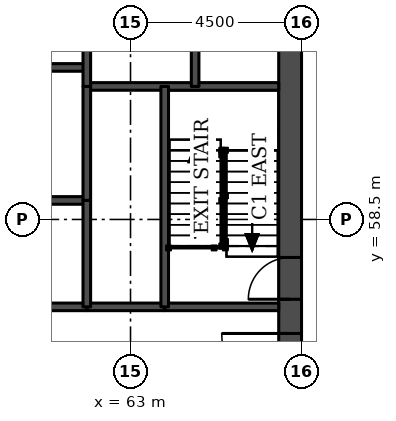
"""IFC4 building model, lengths in metres.
Left out: names, types, materials, properties, quantities, classifications, styles, units other than length and angle.
Written with IfcOpenShell. Run it as: python <this file> out.ifc"""

import sys

from ifc_helpers import new_model, si_unit, direction, frame, frame_2d, origin, place, context, subcontext, project, spatial, rectangle, extrude, element, fill, save


model = new_model("IFC4")
c1 = context("Model", 3, precision=1e-05, world=origin(), true_north=direction((0.0, 1.0)))
c2 = subcontext(c1, "Body", "Model", "MODEL_VIEW")
j1 = project(units=[si_unit("LENGTHUNIT", "METRE"), si_unit("PLANEANGLEUNIT", "RADIAN")], contexts=[c1])
p1 = place(None, origin())
s1 = spatial("IfcSite", under=j1, at=p1, CompositionType="ELEMENT")
p2 = place(p1, origin())
s2 = spatial("IfcBuilding", under=s1, at=p2, CompositionType="ELEMENT")
p3 = place(p2, frame((0.0, 0.0, 13.5)))
s3 = spatial("IfcBuildingStorey", under=s2, at=p3, CompositionType="ELEMENT", Elevation=13.5)
p4 = place(p3, frame((67.2, 49.5, 0.0), z_axis=(0.0, 0.0, 1.0), x_axis=(0.0, 1.0, 0.0)))
e1 = element("IfcWall", 1, at=p4, inside=s3, PredefinedType="SHEAR", context=c2, shape_type="SweptSolid", body=[
    extrude(rectangle(XDim=22.5, YDim=0.6, at=frame_2d((11.25, 0.0))), origin(), (0.0, 0.0, 1.0), 5.0),
])
p5 = place(p4, frame((4.2, 0.0, 0.0)))
e2 = element("IfcOpeningElement", 2, at=p5, cuts=e1, PredefinedType="OPENING", context=c2, shape_type="SweptSolid", body=[
    extrude(rectangle(XDim=1.8, YDim=2.1, at=frame_2d((0.9, 1.05))), frame((0.0, 0.31, 0.0), z_axis=(0.0, -1.0, 0.0), x_axis=(1.0, 0.0, 0.0)), (0.0, 0.0, 1.0), 0.62),
])
p6 = place(p4, frame((6.9, 0.0, 0.0)))
e3 = element("IfcOpeningElement", 3, at=p6, cuts=e1, PredefinedType="OPENING", context=c2, shape_type="SweptSolid", body=[
    extrude(rectangle(XDim=1.1, YDim=2.1, at=frame_2d((0.55, 1.05))), frame((0.0, 0.31, 0.0), z_axis=(0.0, -1.0, 0.0), x_axis=(1.0, 0.0, 0.0)), (0.0, 0.0, 1.0), 0.62),
])
p7 = place(p4, frame((13.6, 0.0, 0.0)))
e4 = element("IfcOpeningElement", 4, at=p7, cuts=e1, PredefinedType="OPENING", context=c2, shape_type="SweptSolid", body=[
    extrude(rectangle(XDim=1.1, YDim=2.1, at=frame_2d((0.55, 1.05))), frame((0.0, 0.31, 0.0), z_axis=(0.0, -1.0, 0.0), x_axis=(1.0, 0.0, 0.0)), (0.0, 0.0, 1.0), 0.62),
])
p8 = place(p4, frame((16.5, 0.0, 0.0)))
e5 = element("IfcOpeningElement", 5, at=p8, cuts=e1, PredefinedType="OPENING", context=c2, shape_type="SweptSolid", body=[
    extrude(rectangle(XDim=1.8, YDim=2.1, at=frame_2d((0.9, 1.05))), frame((0.0, 0.31, 0.0), z_axis=(0.0, -1.0, 0.0), x_axis=(1.0, 0.0, 0.0)), (0.0, 0.0, 1.0), 0.62),
])
p9 = place(p3, frame((61.85, 56.2, 0.0), z_axis=(0.0, 0.0, 1.0), x_axis=(1.0, 0.0, 0.0)))
e6 = element("IfcWall", 6, at=p9, inside=s3, PredefinedType="SOLIDWALL", context=c2, shape_type="SweptSolid", body=[
    extrude(rectangle(XDim=2.05, YDim=0.2, at=frame_2d((1.025, 0.0))), origin(), (0.0, 0.0, 1.0), 4.78),
])
p10 = place(p3, frame((50.65, 56.2, 0.0), z_axis=(0.0, 0.0, 1.0), x_axis=(1.0, 0.0, 0.0)))
e7 = element("IfcWall", 7, at=p10, inside=s3, PredefinedType="SOLIDWALL", context=c2, shape_type="SweptSolid", body=[
    extrude(rectangle(XDim=11.2, YDim=0.2, at=frame_2d((5.6, 0.0))), origin(), (0.0, 0.0, 1.0), 4.78),
])
p11 = place(p3, frame((63.9, 56.2, 0.0), z_axis=(0.0, 0.0, 1.0), x_axis=(1.0, 0.0, 0.0)))
e8 = element("IfcWall", 8, at=p11, inside=s3, PredefinedType="SOLIDWALL", context=c2, shape_type="SweptSolid", body=[
    extrude(rectangle(XDim=3.0, YDim=0.2, at=frame_2d((1.5, 0.0))), origin(), (0.0, 0.0, 1.0), 4.78),
])
p12 = place(p3, frame((50.65, 59.0, 0.0), z_axis=(0.0, 0.0, 1.0), x_axis=(1.0, 0.0, 0.0)))
e9 = element("IfcWall", 9, at=p12, inside=s3, PredefinedType="SOLIDWALL", context=c2, shape_type="SweptSolid", body=[
    extrude(rectangle(XDim=11.2, YDim=0.2, at=frame_2d((5.6, 0.0))), origin(), (0.0, 0.0, 1.0), 5.0),
])
p13 = place(p3, frame((61.85, 62.0, 0.0), z_axis=(0.0, 0.0, 1.0), x_axis=(1.0, 0.0, 0.0)))
e10 = element("IfcWall", 10, at=p13, inside=s3, PredefinedType="SOLIDWALL", context=c2, shape_type="SweptSolid", body=[
    extrude(rectangle(XDim=5.05, YDim=0.2, at=frame_2d((2.525, 0.0))), origin(), (0.0, 0.0, 1.0), 4.78),
])
p14 = place(p3, frame((50.65, 62.5, 0.0), z_axis=(0.0, 0.0, 1.0), x_axis=(1.0, 0.0, 0.0)))
e11 = element("IfcWall", 11, at=p14, inside=s3, PredefinedType="SOLIDWALL", context=c2, shape_type="SweptSolid", body=[
    extrude(rectangle(XDim=11.2, YDim=0.2, at=frame_2d((5.6, 0.0))), origin(), (0.0, 0.0, 1.0), 5.0),
])
p15 = place(p3, frame((61.85, 59.0, 0.0), z_axis=(0.0, 0.0, 1.0), x_axis=(0.0, 1.0, 0.0)))
e12 = element("IfcWall", 12, at=p15, inside=s3, PredefinedType="SOLIDWALL", context=c2, shape_type="SweptSolid", body=[
    extrude(rectangle(XDim=3.0, YDim=0.2, at=frame_2d((1.5, 0.0))), origin(), (0.0, 0.0, 1.0), 5.0),
])
p16 = place(p3, frame((61.85, 56.2, 0.0), z_axis=(0.0, 0.0, 1.0), x_axis=(0.0, 1.0, 0.0)))
e13 = element("IfcWall", 13, at=p16, inside=s3, PredefinedType="SOLIDWALL", context=c2, shape_type="SweptSolid", body=[
    extrude(rectangle(XDim=2.8, YDim=0.2, at=frame_2d((1.4, 0.0))), origin(), (0.0, 0.0, 1.0), 4.78),
])
p17 = place(p3, frame((61.85, 62.0, 0.0), z_axis=(0.0, 0.0, 1.0), x_axis=(0.0, 1.0, 0.0)))
e14 = element("IfcWall", 14, at=p17, inside=s3, PredefinedType="SOLIDWALL", context=c2, shape_type="SweptSolid", body=[
    extrude(rectangle(XDim=3.3, YDim=0.2, at=frame_2d((1.65, 0.0))), origin(), (0.0, 0.0, 1.0), 4.78),
])
p18 = place(p3, frame((63.9, 56.2, 0.0), z_axis=(0.0, 0.0, 1.0), x_axis=(0.0, 1.0, 0.0)))
e15 = element("IfcWall", 15, at=p18, inside=s3, PredefinedType="SOLIDWALL", context=c2, shape_type="SweptSolid", body=[
    extrude(rectangle(XDim=5.8, YDim=0.2, at=frame_2d((2.9, 0.0))), origin(), (0.0, 0.0, 1.0), 4.78),
])
p19 = place(p3, frame((64.7, 62.0, 0.0), z_axis=(0.0, 0.0, 1.0), x_axis=(0.0, 1.0, 0.0)))
e16 = element("IfcWall", 16, at=p19, inside=s3, PredefinedType="SOLIDWALL", context=c2, shape_type="SweptSolid", body=[
    extrude(rectangle(XDim=3.3, YDim=0.2, at=frame_2d((1.65, 0.0))), origin(), (0.0, 0.0, 1.0), 4.78),
])
p20 = place(p19, frame((1.1, 0.0, 0.0)))
e17 = element("IfcOpeningElement", 17, at=p20, cuts=e16, PredefinedType="OPENING", context=c2, shape_type="SweptSolid", body=[
    extrude(rectangle(XDim=1.1, YDim=2.1, at=frame_2d((0.55, 1.05))), frame((0.0, 0.11, 0.0), z_axis=(0.0, -1.0, 0.0), x_axis=(1.0, 0.0, 0.0)), (0.0, 0.0, 1.0), 0.22),
])
p21 = place(p5, origin())
e18 = element("IfcDoor", 18, at=p21, inside=s3, OperationType="SINGLE_SWING_RIGHT", PredefinedType="DOOR", context=c2, shape_type="SweptSolid", body=[
    extrude(rectangle(XDim=1.8, YDim=2.1, at=frame_2d((0.9, 1.05))), frame((0.0, 0.025, 0.0), z_axis=(0.0, -1.0, 0.0), x_axis=(1.0, 0.0, 0.0)), (0.0, 0.0, 1.0), 0.05),
])
fill(e2, e18)
p22 = place(p6, origin())
e19 = element("IfcDoor", 19, at=p22, inside=s3, OperationType="SINGLE_SWING_LEFT", PredefinedType="DOOR", context=c2, shape_type="SweptSolid", body=[
    extrude(rectangle(XDim=1.1, YDim=2.1, at=frame_2d((0.55, 1.05))), frame((0.0, 0.025, 0.0), z_axis=(0.0, -1.0, 0.0), x_axis=(1.0, 0.0, 0.0)), (0.0, 0.0, 1.0), 0.05),
])
fill(e3, e19)
save(model, sys.argv[1])
